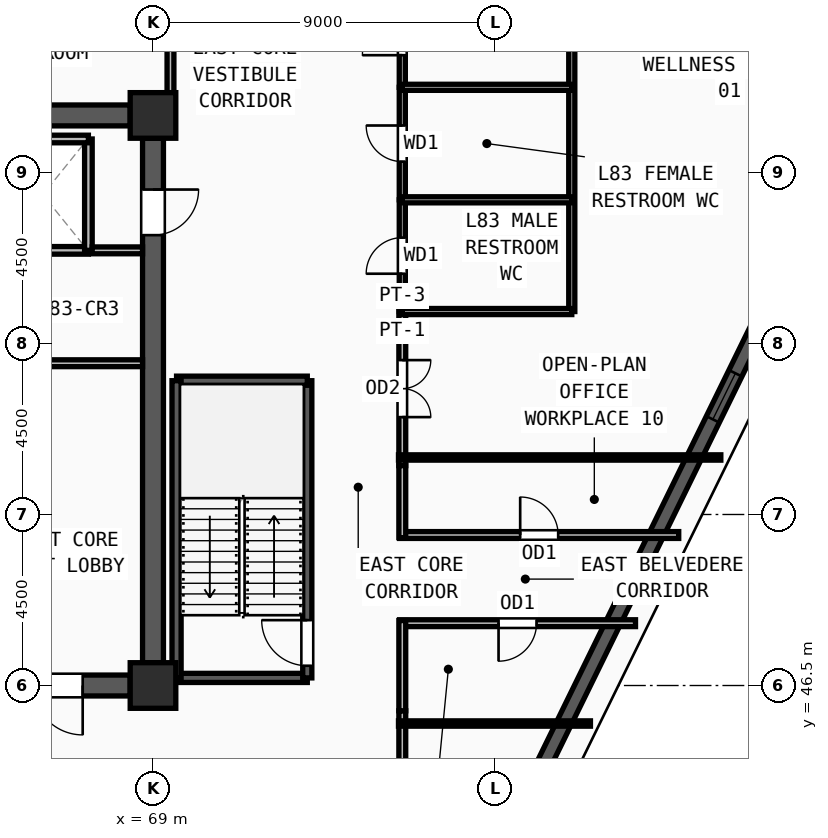
"""IFC4 building model, lengths in metres.
Left out: names, types, materials, properties, quantities, classifications, styles, units other than length and angle.
Written with IfcOpenShell. Run it as: python <this file> out.ifc"""

import sys

from ifc_helpers import new_model, si_unit, direction, frame, frame_2d, origin, origin_2d, place, context, subcontext, project, spatial, rectangle, extrude, source, transform, mapped, element, fill, save


model = new_model("IFC4")
c1 = context("Model", 3, precision=1e-05, world=origin(), true_north=direction((0.0, 1.0)))
c2 = subcontext(c1, "Body", "Model", "MODEL_VIEW")
j1 = project(units=[si_unit("LENGTHUNIT", "METRE"), si_unit("PLANEANGLEUNIT", "RADIAN")], contexts=[c1])
p1 = place(None, origin())
s1 = spatial("IfcSite", under=j1, at=p1, CompositionType="ELEMENT")
p2 = place(p1, origin())
s2 = spatial("IfcBuilding", under=s1, at=p2, CompositionType="ELEMENT")
p3 = place(p2, frame((0.0, 0.0, 320.25)))
s3 = spatial("IfcBuildingStorey", under=s2, at=p3, CompositionType="ELEMENT", Elevation=320.25)
m1 = source(origin(), c2, "Body", "SweptSolid", [
    extrude(rectangle(XDim=1.2, YDim=1.2, at=origin_2d()), origin(), (0.0, 0.0, 1.0), 3.75),
])
for number, where, z_axis, x_axis in (
    (1, (69.0, 46.5, 0.0), (0.0, 0.0, 1.0), (1.0, 0.0, 0.0)),
    (2, (69.0, 61.5, 0.0), (0.0, 0.0, 1.0), (1.0, 0.0, 0.0)),
):
    element("IfcColumn", number, at=place(p3, frame(where, z_axis=z_axis, x_axis=x_axis)), inside=s3, PredefinedType="COLUMN", context=c2, shape_type="MappedRepresentation", body=[
        mapped(m1, transform((0.0, 0.0, 0.0), x_axis=(1.0, 0.0, 0.0), y_axis=(0.0, 1.0, 0.0), z_axis=(0.0, 0.0, 1.0), scale=1.0)),
    ])
p4 = place(p3, frame((77.918, 41.639, 0.0), z_axis=(0.0, 0.0, 1.0), x_axis=(0.440053301327, 0.897971654336, 0.0)))
e3 = element("IfcWall", 3, at=p4, inside=s3, PredefinedType="SOLIDWALL", context=c2, shape_type="SweptSolid", body=[
    extrude(rectangle(XDim=26.074, YDim=0.38, at=frame_2d((13.037, 0.0))), origin(), (0.0, 0.0, 1.0), 3.47),
])
m2 = source(origin(), c2, "Body", "SweptSolid", [
    extrude(rectangle(XDim=1.35, YDim=1.85, at=frame_2d((0.675, 0.925))), frame((0.0, 0.2, 0.0), z_axis=(0.0, -1.0, 0.0), x_axis=(1.0, 0.0, 0.0)), (0.0, 0.0, 1.0), 0.4),
])
p5 = place(p4, frame((13.212, 0.0, 0.55)))
e4 = element("IfcOpeningElement", 4, at=p5, cuts=e3, PredefinedType="OPENING", context=c2, shape_type="MappedRepresentation", body=[
    mapped(m2, transform((0.0, 0.0, 0.0), x_axis=(1.0, 0.0, 0.0), y_axis=(0.0, 1.0, 0.0), z_axis=(0.0, 0.0, 1.0), scale=1.0)),
])
p6 = place(p4, frame((18.881, 0.0, 0.55)))
e5 = element("IfcOpeningElement", 5, at=p6, cuts=e3, PredefinedType="OPENING", context=c2, shape_type="MappedRepresentation", body=[
    mapped(m2, transform((0.0, 0.0, 0.0), x_axis=(1.0, 0.0, 0.0), y_axis=(0.0, 1.0, 0.0), z_axis=(0.0, 0.0, 1.0), scale=1.0)),
])
p7 = place(p3, frame((60.6, 61.5, 0.0), z_axis=(0.0, 0.0, 1.0), x_axis=(1.0, 0.0, 0.0)))
e6 = element("IfcWall", 6, at=p7, inside=s3, PredefinedType="SHEAR", context=c2, shape_type="SweptSolid", body=[
    extrude(rectangle(XDim=7.8, YDim=0.55, at=frame_2d((3.9, 0.0))), origin(), (0.0, 0.0, 1.0), 3.47),
])
p8 = place(p3, frame((69.0, 60.9, 0.0), z_axis=(0.0, 0.0, 1.0), x_axis=(0.0, -1.0, 0.0)))
e7 = element("IfcWall", 7, at=p8, inside=s3, PredefinedType="SHEAR", context=c2, shape_type="SweptSolid", body=[
    extrude(rectangle(XDim=13.8, YDim=0.55, at=frame_2d((6.9, 0.0))), origin(), (0.0, 0.0, 1.0), 3.47),
])
m3 = source(origin(), c2, "Body", "SweptSolid", [
    extrude(rectangle(XDim=1.2, YDim=2.2, at=frame_2d((0.6, 1.1))), frame((0.0, 0.285, 0.0), z_axis=(0.0, -1.0, 0.0), x_axis=(1.0, 0.0, 0.0)), (0.0, 0.0, 1.0), 0.57),
])
p9 = place(p8, frame((1.35, 0.0, 0.0)))
e8 = element("IfcOpeningElement", 8, at=p9, cuts=e7, PredefinedType="OPENING", context=c2, shape_type="MappedRepresentation", body=[
    mapped(m3, transform((0.0, 0.0, 0.0), x_axis=(1.0, 0.0, 0.0), y_axis=(0.0, 1.0, 0.0), z_axis=(0.0, 0.0, 1.0), scale=1.0)),
])
p10 = place(p3, frame((68.4, 46.5, 0.0), z_axis=(0.0, 0.0, 1.0), x_axis=(-1.0, 0.0, 0.0)))
e9 = element("IfcWall", 9, at=p10, inside=s3, PredefinedType="SHEAR", context=c2, shape_type="SweptSolid", body=[
    extrude(rectangle(XDim=7.8, YDim=0.55, at=frame_2d((3.9, 0.0))), origin(), (0.0, 0.0, 1.0), 3.47),
])
m4 = source(origin(), c2, "Body", "SweptSolid", [
    extrude(rectangle(XDim=1.3, YDim=2.2, at=frame_2d((0.65, 1.1))), frame((0.0, 0.285, 0.0), z_axis=(0.0, -1.0, 0.0), x_axis=(1.0, 0.0, 0.0)), (0.0, 0.0, 1.0), 0.57),
])
p11 = place(p10, frame((1.25, 0.0, 0.0)))
e10 = element("IfcOpeningElement", 10, at=p11, cuts=e9, PredefinedType="OPENING", context=c2, shape_type="MappedRepresentation", body=[
    mapped(m4, transform((0.0, 0.0, 0.0), x_axis=(1.0, 0.0, 0.0), y_axis=(0.0, 1.0, 0.0), z_axis=(0.0, 0.0, 1.0), scale=1.0)),
])
p12 = place(p3, frame((69.62, 46.7, 0.0), z_axis=(0.0, 0.0, 1.0), x_axis=(1.0, 0.0, 0.0)))
e11 = element("IfcWall", 11, at=p12, inside=s3, PredefinedType="SOLIDWALL", context=c2, shape_type="SweptSolid", body=[
    extrude(rectangle(XDim=3.44, YDim=0.24, at=frame_2d((1.72, 0.0))), origin(), (0.0, 0.0, 1.0), 3.47),
])
p13 = place(p3, frame((73.06, 46.7, 0.0), z_axis=(0.0, 0.0, 1.0), x_axis=(0.0, 1.0, 0.0)))
e12 = element("IfcWall", 12, at=p13, inside=s3, PredefinedType="SOLIDWALL", context=c2, shape_type="SweptSolid", body=[
    extrude(rectangle(XDim=7.82, YDim=0.24, at=frame_2d((3.91, 0.0))), origin(), (0.0, 0.0, 1.0), 3.47),
])
m5 = source(origin(), c2, "Body", "SweptSolid", [
    extrude(rectangle(XDim=1.2, YDim=2.2, at=frame_2d((0.6, 1.1))), frame((0.0, 0.13, 0.0), z_axis=(0.0, -1.0, 0.0), x_axis=(1.0, 0.0, 0.0)), (0.0, 0.0, 1.0), 0.26),
])
p14 = place(p13, frame((0.32, 0.0, 0.0)))
e13 = element("IfcOpeningElement", 13, at=p14, cuts=e12, PredefinedType="OPENING", context=c2, shape_type="MappedRepresentation", body=[
    mapped(m5, transform((0.0, 0.0, 0.0), x_axis=(1.0, 0.0, 0.0), y_axis=(0.0, 1.0, 0.0), z_axis=(0.0, 0.0, 1.0), scale=1.0)),
])
p15 = place(p3, frame((73.06, 54.52, 0.0), z_axis=(0.0, 0.0, 1.0), x_axis=(-1.0, 0.0, 0.0)))
e14 = element("IfcWall", 14, at=p15, inside=s3, PredefinedType="SOLIDWALL", context=c2, shape_type="SweptSolid", body=[
    extrude(rectangle(XDim=3.44, YDim=0.24, at=frame_2d((1.72, 0.0))), origin(), (0.0, 0.0, 1.0), 3.47),
])
p16 = place(p3, frame((69.62, 54.52, 0.0), z_axis=(0.0, 0.0, 1.0), x_axis=(0.0, -1.0, 0.0)))
e15 = element("IfcWall", 15, at=p16, inside=s3, PredefinedType="SOLIDWALL", context=c2, shape_type="SweptSolid", body=[
    extrude(rectangle(XDim=7.82, YDim=0.24, at=frame_2d((3.91, 0.0))), origin(), (0.0, 0.0, 1.0), 3.47),
])
p17 = place(p3, frame((64.9, 57.95, 0.0), z_axis=(0.0, 0.0, 1.0), x_axis=(1.0, 0.0, 0.0)))
e16 = element("IfcWall", 16, at=p17, inside=s3, PredefinedType="SOLIDWALL", context=c2, shape_type="SweptSolid", body=[
    extrude(rectangle(XDim=2.4, YDim=0.2, at=frame_2d((1.2, 0.0))), origin(), (0.0, 0.0, 1.0), 3.47),
])
p18 = place(p3, frame((67.3, 57.95, 0.0), z_axis=(0.0, 0.0, 1.0), x_axis=(0.0, 1.0, 0.0)))
e17 = element("IfcWall", 17, at=p18, inside=s3, PredefinedType="SOLIDWALL", context=c2, shape_type="SweptSolid", body=[
    extrude(rectangle(XDim=2.93, YDim=0.2, at=frame_2d((1.465, 0.0))), origin(), (0.0, 0.0, 1.0), 3.47),
])
p19 = place(p3, frame((67.3, 60.88, 0.0), z_axis=(0.0, 0.0, 1.0), x_axis=(-1.0, 0.0, 0.0)))
e18 = element("IfcWall", 18, at=p19, inside=s3, PredefinedType="SOLIDWALL", context=c2, shape_type="SweptSolid", body=[
    extrude(rectangle(XDim=2.4, YDim=0.2, at=frame_2d((1.2, 0.0))), origin(), (0.0, 0.0, 1.0), 3.47),
])
p20 = place(p3, frame((62.1, 54.98, 0.0), z_axis=(0.0, 0.0, 1.0), x_axis=(1.0, 0.0, 0.0)))
e19 = element("IfcWall", 19, at=p20, inside=s3, PredefinedType="PARTITIONING", context=c2, shape_type="SweptSolid", body=[
    extrude(rectangle(XDim=6.625, YDim=0.18, at=frame_2d((3.312, 0.0))), origin(), (0.0, 0.0, 1.0), 3.47),
])
m6 = source(origin(), c2, "Body", "SweptSolid", [
    extrude(rectangle(XDim=0.85, YDim=2.1, at=frame_2d((0.425, 1.05))), frame((0.0, 0.1, 0.0), z_axis=(0.0, -1.0, 0.0), x_axis=(1.0, 0.0, 0.0)), (0.0, 0.0, 1.0), 0.2),
])
p21 = place(p20, frame((2.8, 0.0, 0.0)))
e20 = element("IfcOpeningElement", 20, at=p21, cuts=e19, PredefinedType="OPENING", context=c2, shape_type="MappedRepresentation", body=[
    mapped(m6, transform((0.0, 0.0, 0.0), x_axis=(1.0, 0.0, 0.0), y_axis=(0.0, 1.0, 0.0), z_axis=(0.0, 0.0, 1.0), scale=1.0)),
])
p22 = place(p3, frame((75.56, 56.34, 0.0), z_axis=(0.0, 0.0, 1.0), x_axis=(0.0, 1.0, 0.0)))
e21 = element("IfcWall", 21, at=p22, inside=s3, PredefinedType="PARTITIONING", context=c2, shape_type="SweptSolid", body=[
    extrude(rectangle(XDim=2.94, YDim=0.16, at=frame_2d((1.47, 0.0))), origin(), (0.0, 0.0, 1.0), 3.47),
])
m7 = source(origin(), c2, "Body", "SweptSolid", [
    extrude(rectangle(XDim=0.95, YDim=2.15, at=frame_2d((0.475, 1.075))), frame((0.0, 0.09, 0.0), z_axis=(0.0, -1.0, 0.0), x_axis=(1.0, 0.0, 0.0)), (0.0, 0.0, 1.0), 0.18),
])
p23 = place(p22, frame((0.995, 0.0, 0.0)))
e22 = element("IfcOpeningElement", 22, at=p23, cuts=e21, PredefinedType="OPENING", context=c2, shape_type="MappedRepresentation", body=[
    mapped(m7, transform((0.0, 0.0, 0.0), x_axis=(1.0, 0.0, 0.0), y_axis=(0.0, 1.0, 0.0), z_axis=(0.0, 0.0, 1.0), scale=1.0)),
])
p24 = place(p3, frame((75.56, 59.28, 0.0), z_axis=(0.0, 0.0, 1.0), x_axis=(0.0, 1.0, 0.0)))
e23 = element("IfcWall", 23, at=p24, inside=s3, PredefinedType="PARTITIONING", context=c2, shape_type="SweptSolid", body=[
    extrude(rectangle(XDim=2.96, YDim=0.16, at=frame_2d((1.48, 0.0))), origin(), (0.0, 0.0, 1.0), 3.47),
])
p25 = place(p24, frame((1.005, 0.0, 0.0)))
e24 = element("IfcOpeningElement", 24, at=p25, cuts=e23, PredefinedType="OPENING", context=c2, shape_type="MappedRepresentation", body=[
    mapped(m7, transform((0.0, 0.0, 0.0), x_axis=(1.0, 0.0, 0.0), y_axis=(0.0, 1.0, 0.0), z_axis=(0.0, 0.0, 1.0), scale=1.0)),
])
p26 = place(p3, frame((75.56, 62.24, 0.0), z_axis=(0.0, 0.0, 1.0), x_axis=(0.0, 1.0, 0.0)))
e25 = element("IfcWall", 25, at=p26, inside=s3, PredefinedType="PARTITIONING", context=c2, shape_type="SweptSolid", body=[
    extrude(rectangle(XDim=2.74, YDim=0.16, at=frame_2d((1.37, 0.0))), origin(), (0.0, 0.0, 1.0), 3.47),
])
m8 = source(origin(), c2, "Body", "SweptSolid", [
    extrude(rectangle(XDim=1.05, YDim=2.15, at=frame_2d((0.525, 1.075))), frame((0.0, 0.09, 0.0), z_axis=(0.0, -1.0, 0.0), x_axis=(1.0, 0.0, 0.0)), (0.0, 0.0, 1.0), 0.18),
])
p27 = place(p26, frame((0.845, 0.0, 0.0)))
e26 = element("IfcOpeningElement", 26, at=p27, cuts=e25, PredefinedType="OPENING", context=c2, shape_type="MappedRepresentation", body=[
    mapped(m8, transform((0.0, 0.0, 0.0), x_axis=(1.0, 0.0, 0.0), y_axis=(0.0, 1.0, 0.0), z_axis=(0.0, 0.0, 1.0), scale=1.0)),
])
p28 = place(p3, frame((75.56, 56.34, 0.0), z_axis=(0.0, 0.0, 1.0), x_axis=(0.0, -1.0, 0.0)))
e27 = element("IfcWall", 27, at=p28, inside=s3, PredefinedType="PARTITIONING", context=c2, shape_type="SweptSolid", body=[
    extrude(rectangle(XDim=4.055, YDim=0.18, at=frame_2d((2.028, 0.0))), origin(), (0.0, 0.0, 1.0), 3.47),
])
m9 = source(origin(), c2, "Body", "SweptSolid", [
    extrude(rectangle(XDim=1.5, YDim=2.2, at=frame_2d((0.75, 1.1))), frame((0.0, 0.1, 0.0), z_axis=(0.0, -1.0, 0.0), x_axis=(1.0, 0.0, 0.0)), (0.0, 0.0, 1.0), 0.2),
])
p29 = place(p28, frame((1.278, 0.0, 0.0)))
e28 = element("IfcOpeningElement", 28, at=p29, cuts=e27, PredefinedType="OPENING", context=c2, shape_type="MappedRepresentation", body=[
    mapped(m9, transform((0.0, 0.0, 0.0), x_axis=(1.0, 0.0, 0.0), y_axis=(0.0, 1.0, 0.0), z_axis=(0.0, 0.0, 1.0), scale=1.0)),
])
p30 = place(p3, frame((81.697, 48.14, 0.0), z_axis=(0.0, 0.0, 1.0), x_axis=(-1.0, 0.0, 0.0)))
e29 = element("IfcWall", 29, at=p30, inside=s3, PredefinedType="PARTITIONING", context=c2, shape_type="SweptSolid", body=[
    extrude(rectangle(XDim=6.207, YDim=0.18, at=frame_2d((3.104, 0.0))), origin(), (0.0, 0.0, 1.0), 3.47),
])
m10 = source(origin(), c2, "Body", "SweptSolid", [
    extrude(rectangle(XDim=1.0, YDim=2.2, at=frame_2d((0.5, 1.1))), frame((0.0, 0.1, 0.0), z_axis=(0.0, -1.0, 0.0), x_axis=(1.0, 0.0, 0.0)), (0.0, 0.0, 1.0), 0.2),
])
p31 = place(p30, frame((2.604, 0.0, 0.0)))
e30 = element("IfcOpeningElement", 30, at=p31, cuts=e29, PredefinedType="OPENING", context=c2, shape_type="MappedRepresentation", body=[
    mapped(m10, transform((0.0, 0.0, 0.0), x_axis=(1.0, 0.0, 0.0), y_axis=(0.0, 1.0, 0.0), z_axis=(0.0, 0.0, 1.0), scale=1.0)),
])
p32 = place(p3, frame((75.49, 50.46, 0.0), z_axis=(0.0, 0.0, 1.0), x_axis=(1.0, 0.0, 0.0)))
e31 = element("IfcWall", 31, at=p32, inside=s3, PredefinedType="PARTITIONING", context=c2, shape_type="SweptSolid", body=[
    extrude(rectangle(XDim=7.344, YDim=0.18, at=frame_2d((3.672, 0.0))), origin(), (0.0, 0.0, 1.0), 3.47),
])
p33 = place(p32, frame((3.172, 0.0, 0.0)))
e32 = element("IfcOpeningElement", 32, at=p33, cuts=e31, PredefinedType="OPENING", context=c2, shape_type="MappedRepresentation", body=[
    mapped(m10, transform((0.0, 0.0, 0.0), x_axis=(1.0, 0.0, 0.0), y_axis=(0.0, 1.0, 0.0), z_axis=(0.0, 0.0, 1.0), scale=1.0)),
])
p34 = place(p3, frame((80.02, 56.34, 0.0), z_axis=(0.0, 0.0, 1.0), x_axis=(0.0, 1.0, 0.0)))
e33 = element("IfcWall", 33, at=p34, inside=s3, PredefinedType="PARTITIONING", context=c2, shape_type="SweptSolid", body=[
    extrude(rectangle(XDim=8.64, YDim=0.16, at=frame_2d((4.32, 0.0))), origin(), (0.0, 0.0, 1.0), 3.47),
])
for number, where, z_axis, x_axis in (
    (34, (75.56, 56.34, 0.0), (0.0, 0.0, 1.0), (1.0, 0.0, 0.0)),
    (35, (75.56, 59.28, 0.0), (0.0, 0.0, 1.0), (1.0, 0.0, 0.0)),
    (36, (75.56, 62.24, 0.0), (0.0, 0.0, 1.0), (1.0, 0.0, 0.0)),
):
    element("IfcWall", number, at=place(p3, frame(where, z_axis=z_axis, x_axis=x_axis)), inside=s3, PredefinedType="PARTITIONING", context=c2, shape_type="SweptSolid", body=[
        extrude(rectangle(XDim=4.46, YDim=0.16, at=frame_2d((2.23, 0.0))), origin(), (0.0, 0.0, 1.0), 3.47),
    ])
p35 = place(p3, frame((69.46, 61.95, 0.0), z_axis=(0.0, 0.0, 1.0), x_axis=(0.0, 1.0, 0.0)))
e37 = element("IfcWall", 37, at=p35, inside=s3, PredefinedType="PARTITIONING", context=c2, shape_type="SweptSolid", body=[
    extrude(rectangle(XDim=3.63, YDim=0.18, at=frame_2d((1.815, 0.0))), origin(), (0.0, 0.0, 1.0), 3.47),
])
p36 = place(p3, frame((75.56, 45.835, 0.0), z_axis=(0.0, 0.0, 1.0), x_axis=(0.0, -1.0, 0.0)))
e38 = element("IfcWall", 38, at=p36, inside=s3, PredefinedType="PARTITIONING", context=c2, shape_type="SweptSolid", body=[
    extrude(rectangle(XDim=2.165, YDim=0.18, at=frame_2d((1.083, 0.0))), origin(), (0.0, 0.0, 1.0), 3.47),
])
p37 = place(p3, frame((75.56, 48.21, 0.0), z_axis=(0.0, 0.0, 1.0), x_axis=(0.0, -1.0, 0.0)))
e39 = element("IfcWall", 39, at=p37, inside=s3, PredefinedType="PARTITIONING", context=c2, shape_type="SweptSolid", body=[
    extrude(rectangle(XDim=2.375, YDim=0.18, at=frame_2d((1.188, 0.0))), origin(), (0.0, 0.0, 1.0), 3.47),
])
p38 = place(p3, frame((75.56, 52.285, 0.0), z_axis=(0.0, 0.0, 1.0), x_axis=(0.0, -1.0, 0.0)))
e40 = element("IfcWall", 40, at=p38, inside=s3, PredefinedType="PARTITIONING", context=c2, shape_type="SweptSolid", body=[
    extrude(rectangle(XDim=1.895, YDim=0.18, at=frame_2d((0.948, 0.0))), origin(), (0.0, 0.0, 1.0), 3.47),
])
p39 = place(p3, frame((75.46, 45.5, 0.0), z_axis=(0.0, 0.0, 1.0), x_axis=(1.0, 0.0, 0.0)))
e41 = element("IfcWall", 41, at=p39, inside=s3, PredefinedType="PARTITIONING", context=c2, shape_type="SweptSolid", body=[
    extrude(rectangle(XDim=5.051, YDim=0.14, at=frame_2d((2.525, 0.0))), origin(), (0.0, 0.0, 1.0), 3.47),
])
p40 = place(p3, frame((75.46, 52.5, 0.0), z_axis=(0.0, 0.0, 1.0), x_axis=(1.0, 0.0, 0.0)))
e42 = element("IfcWall", 42, at=p40, inside=s3, PredefinedType="PARTITIONING", context=c2, shape_type="SweptSolid", body=[
    extrude(rectangle(XDim=8.482, YDim=0.14, at=frame_2d((4.241, 0.0))), origin(), (0.0, 0.0, 1.0), 3.47),
])
p41 = place(p3, frame((67.4, 57.95, 0.0), z_axis=(0.0, 0.0, 1.0), x_axis=(1.0, 0.0, 0.0)))
e43 = element("IfcWall", 43, at=p41, inside=s3, PredefinedType="PARTITIONING", context=c2, shape_type="SweptSolid", body=[
    extrude(rectangle(XDim=1.325, YDim=0.18, at=frame_2d((0.663, 0.0))), origin(), (0.0, 0.0, 1.0), 3.47),
])
m11 = source(origin(), c2, "Body", "SweptSolid", [
    extrude(rectangle(XDim=1.35, YDim=1.85, at=frame_2d((0.675, 0.925))), frame((0.0, 0.03, 0.0), z_axis=(0.0, -1.0, 0.0), x_axis=(1.0, 0.0, 0.0)), (0.0, 0.0, 1.0), 0.06),
])
p42 = place(p5, origin())
e44 = element("IfcWindow", 44, at=p42, inside=s3, PartitioningType="SINGLE_PANEL", PredefinedType="WINDOW", context=c2, shape_type="MappedRepresentation", body=[
    mapped(m11, transform((0.0, 0.0, 0.0), x_axis=(1.0, 0.0, 0.0), y_axis=(0.0, 1.0, 0.0), z_axis=(0.0, 0.0, 1.0), scale=1.0)),
])
fill(e4, e44)
m12 = source(origin(), c2, "Body", "SweptSolid", [
    extrude(rectangle(XDim=1.3, YDim=2.2, at=frame_2d((0.65, 1.1))), frame((0.0, 0.025, 0.0), z_axis=(0.0, -1.0, 0.0), x_axis=(1.0, 0.0, 0.0)), (0.0, 0.0, 1.0), 0.05),
])
p43 = place(p11, origin())
e45 = element("IfcDoor", 45, at=p43, inside=s3, OperationType="SINGLE_SWING_LEFT", PredefinedType="DOOR", context=c2, shape_type="MappedRepresentation", body=[
    mapped(m12, transform((0.0, 0.0, 0.0), x_axis=(1.0, 0.0, 0.0), y_axis=(0.0, 1.0, 0.0), z_axis=(0.0, 0.0, 1.0), scale=1.0)),
])
fill(e10, e45)
m13 = source(origin(), c2, "Body", "SweptSolid", [
    extrude(rectangle(XDim=1.2, YDim=2.2, at=frame_2d((0.6, 1.1))), frame((0.0, 0.025, 0.0), z_axis=(0.0, -1.0, 0.0), x_axis=(1.0, 0.0, 0.0)), (0.0, 0.0, 1.0), 0.05),
])
p44 = place(p9, origin())
e46 = element("IfcDoor", 46, at=p44, inside=s3, OperationType="SINGLE_SWING_LEFT", PredefinedType="DOOR", context=c2, shape_type="MappedRepresentation", body=[
    mapped(m13, transform((0.0, 0.0, 0.0), x_axis=(1.0, 0.0, 0.0), y_axis=(0.0, 1.0, 0.0), z_axis=(0.0, 0.0, 1.0), scale=1.0)),
])
fill(e8, e46)
p45 = place(p14, origin())
e47 = element("IfcDoor", 47, at=p45, inside=s3, OperationType="SINGLE_SWING_RIGHT", PredefinedType="DOOR", context=c2, shape_type="MappedRepresentation", body=[
    mapped(m13, transform((0.0, 0.0, 0.0), x_axis=(1.0, 0.0, 0.0), y_axis=(0.0, 1.0, 0.0), z_axis=(0.0, 0.0, 1.0), scale=1.0)),
])
fill(e13, e47)
m14 = source(origin(), c2, "Body", "SweptSolid", [
    extrude(rectangle(XDim=0.95, YDim=2.15, at=frame_2d((0.475, 1.075))), frame((0.0, 0.025, 0.0), z_axis=(0.0, -1.0, 0.0), x_axis=(1.0, 0.0, 0.0)), (0.0, 0.0, 1.0), 0.05),
])
p46 = place(p23, origin())
e48 = element("IfcDoor", 48, at=p46, inside=s3, OperationType="SINGLE_SWING_LEFT", PredefinedType="DOOR", context=c2, shape_type="MappedRepresentation", body=[
    mapped(m14, transform((0.0, 0.0, 0.0), x_axis=(1.0, 0.0, 0.0), y_axis=(0.0, 1.0, 0.0), z_axis=(0.0, 0.0, 1.0), scale=1.0)),
])
fill(e22, e48)
p47 = place(p25, origin())
e49 = element("IfcDoor", 49, at=p47, inside=s3, OperationType="SINGLE_SWING_RIGHT", PredefinedType="DOOR", context=c2, shape_type="MappedRepresentation", body=[
    mapped(m14, transform((0.0, 0.0, 0.0), x_axis=(1.0, 0.0, 0.0), y_axis=(0.0, 1.0, 0.0), z_axis=(0.0, 0.0, 1.0), scale=1.0)),
])
fill(e24, e49)
m15 = source(origin(), c2, "Body", "SweptSolid", [
    extrude(rectangle(XDim=1.05, YDim=2.15, at=frame_2d((0.525, 1.075))), frame((0.0, 0.025, 0.0), z_axis=(0.0, -1.0, 0.0), x_axis=(1.0, 0.0, 0.0)), (0.0, 0.0, 1.0), 0.05),
])
p48 = place(p27, origin())
e50 = element("IfcDoor", 50, at=p48, inside=s3, OperationType="SINGLE_SWING_LEFT", PredefinedType="DOOR", context=c2, shape_type="MappedRepresentation", body=[
    mapped(m15, transform((0.0, 0.0, 0.0), x_axis=(1.0, 0.0, 0.0), y_axis=(0.0, 1.0, 0.0), z_axis=(0.0, 0.0, 1.0), scale=1.0)),
])
fill(e26, e50)
m16 = source(origin(), c2, "Body", "SweptSolid", [
    extrude(rectangle(XDim=1.5, YDim=2.2, at=frame_2d((0.75, 1.1))), frame((0.0, 0.025, 0.0), z_axis=(0.0, -1.0, 0.0), x_axis=(1.0, 0.0, 0.0)), (0.0, 0.0, 1.0), 0.05),
])
p49 = place(p29, origin())
e51 = element("IfcDoor", 51, at=p49, inside=s3, OperationType="DOUBLE_DOOR_SINGLE_SWING", PredefinedType="DOOR", context=c2, shape_type="MappedRepresentation", body=[
    mapped(m16, transform((0.0, 0.0, 0.0), x_axis=(1.0, 0.0, 0.0), y_axis=(0.0, 1.0, 0.0), z_axis=(0.0, 0.0, 1.0), scale=1.0)),
])
fill(e28, e51)
m17 = source(origin(), c2, "Body", "SweptSolid", [
    extrude(rectangle(XDim=1.0, YDim=2.2, at=frame_2d((0.5, 1.1))), frame((0.0, 0.025, 0.0), z_axis=(0.0, -1.0, 0.0), x_axis=(1.0, 0.0, 0.0)), (0.0, 0.0, 1.0), 0.05),
])
p50 = place(p31, origin())
e52 = element("IfcDoor", 52, at=p50, inside=s3, OperationType="SINGLE_SWING_RIGHT", PredefinedType="DOOR", context=c2, shape_type="MappedRepresentation", body=[
    mapped(m17, transform((0.0, 0.0, 0.0), x_axis=(1.0, 0.0, 0.0), y_axis=(0.0, 1.0, 0.0), z_axis=(0.0, 0.0, 1.0), scale=1.0)),
])
fill(e30, e52)
p51 = place(p33, origin())
e53 = element("IfcDoor", 53, at=p51, inside=s3, OperationType="SINGLE_SWING_LEFT", PredefinedType="DOOR", context=c2, shape_type="MappedRepresentation", body=[
    mapped(m17, transform((0.0, 0.0, 0.0), x_axis=(1.0, 0.0, 0.0), y_axis=(0.0, 1.0, 0.0), z_axis=(0.0, 0.0, 1.0), scale=1.0)),
])
fill(e32, e53)
save(model, sys.argv[1])
